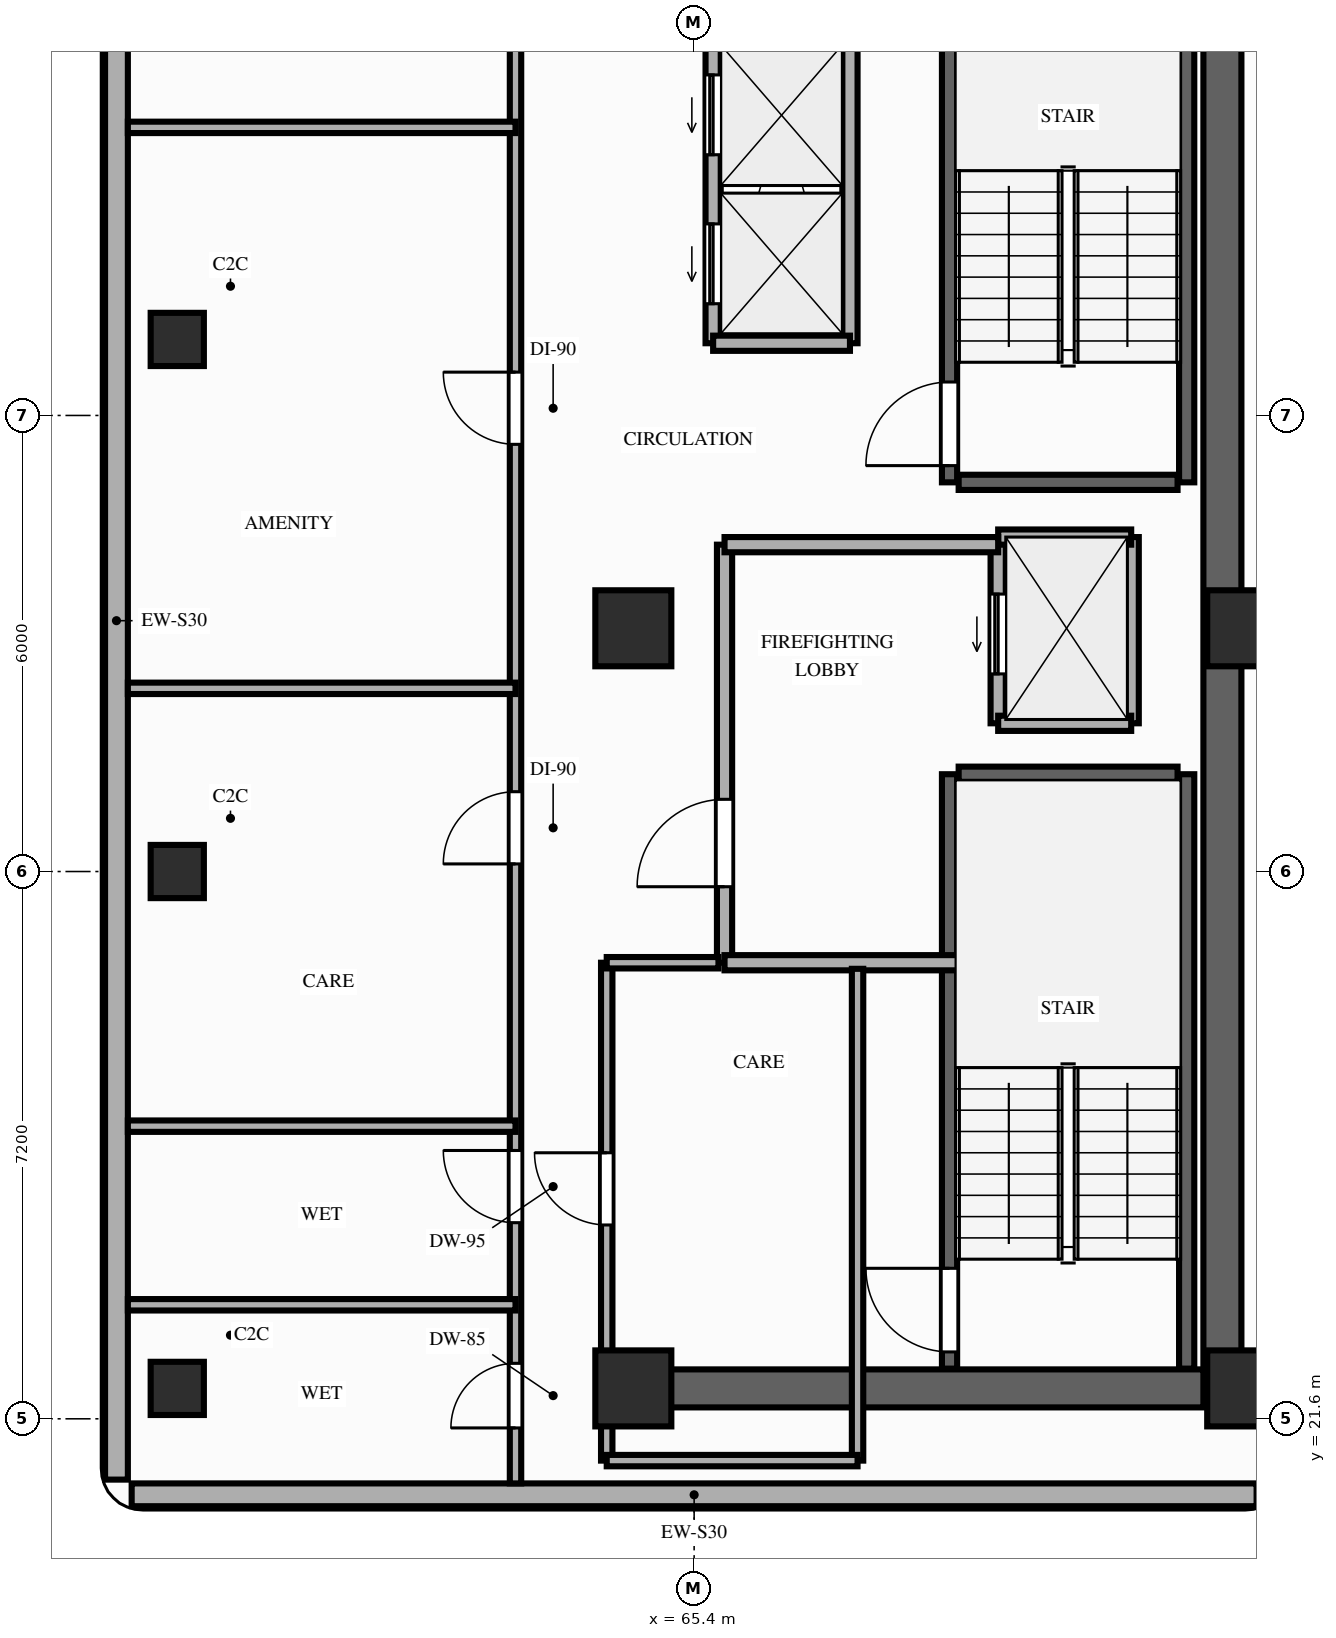
"""IFC4 building model, lengths in metres.
Left out: names, types, materials, properties, quantities, classifications, styles, units other than length and angle.
Written with IfcOpenShell. Run it as: python <this file> out.ifc"""

import sys

from ifc_helpers import new_model, si_unit, direction, frame, frame_2d, origin, origin_2d, place, context, subcontext, project, spatial, rectangle, extrude, element, fill, save


model = new_model("IFC4")
c1 = context("Model", 3, precision=1e-05, world=origin(), true_north=direction((0.0, 1.0)))
c2 = subcontext(c1, "Body", "Model", "MODEL_VIEW")
j1 = project(units=[si_unit("LENGTHUNIT", "METRE"), si_unit("PLANEANGLEUNIT", "RADIAN")], contexts=[c1])
p1 = place(None, origin())
s1 = spatial("IfcSite", under=j1, at=p1, CompositionType="ELEMENT")
p2 = place(p1, origin())
s2 = spatial("IfcBuilding", under=s1, at=p2, CompositionType="ELEMENT")
p3 = place(p2, frame((0.0, 0.0, 93.0)))
s3 = spatial("IfcBuildingStorey", under=s2, at=p3, CompositionType="ELEMENT", Elevation=93.0)
for number, where, z_axis, x_axis in (
    (1, (64.6, 22.0, 0.0), (0.0, 0.0, 1.0), (1.0, 0.0, 0.0)),
    (2, (72.65, 22.0, 0.0), (0.0, 0.0, 1.0), (1.0, 0.0, 0.0)),
    (3, (64.6, 32.0, 0.0), (0.0, 0.0, 1.0), (1.0, 0.0, 0.0)),
    (4, (72.65, 32.0, 0.0), (0.0, 0.0, 1.0), (1.0, 0.0, 0.0)),
):
    element("IfcColumn", number, at=place(p3, frame(where, z_axis=z_axis, x_axis=x_axis)), inside=s3, PredefinedType="COLUMN", context=c2, shape_type="SweptSolid", body=[
        extrude(rectangle(XDim=1.0, YDim=1.0, at=origin_2d()), origin(), (0.0, 0.0, 1.0), 3.2),
    ])
for number, where, z_axis, x_axis in (
    (5, (58.6, 22.0, 0.0), (0.0, 0.0, 1.0), (1.0, 0.0, 0.0)),
    (6, (58.6, 28.8, 0.0), (0.0, 0.0, 1.0), (1.0, 0.0, 0.0)),
    (7, (58.6, 35.8, 0.0), (0.0, 0.0, 1.0), (1.0, 0.0, 0.0)),
):
    element("IfcColumn", number, at=place(p3, frame(where, z_axis=z_axis, x_axis=x_axis)), inside=s3, PredefinedType="COLUMN", context=c2, shape_type="SweptSolid", body=[
        extrude(rectangle(XDim=0.7, YDim=0.7, at=origin_2d()), origin(), (0.0, 0.0, 1.0), 3.2),
    ])
p4 = place(p3, frame((57.8, 43.4, 0.0), z_axis=(0.0, 0.0, 1.0), x_axis=(0.0, -1.0, 0.0)))
e8 = element("IfcWall", 8, at=p4, inside=s3, PredefinedType="STANDARD", context=c2, shape_type="SweptSolid", body=[
    extrude(rectangle(XDim=22.6, YDim=0.3, at=frame_2d((11.3, 0.0))), origin(), (0.0, 0.0, 1.0), 2.73),
])
p5 = place(p3, frame((58.0, 20.6, 0.0), z_axis=(0.0, 0.0, 1.0), x_axis=(1.0, 0.0, 0.0)))
e9 = element("IfcWall", 9, at=p5, inside=s3, PredefinedType="STANDARD", context=c2, shape_type="SweptSolid", body=[
    extrude(rectangle(XDim=14.8, YDim=0.3, at=frame_2d((7.4, 0.0))), origin(), (0.0, 0.0, 1.0), 3.02),
])
p6 = place(p3, frame((72.35, 22.0, 0.0), z_axis=(0.0, 0.0, 1.0), x_axis=(0.0, 1.0, 0.0)))
e10 = element("IfcWall", 10, at=p6, inside=s3, PredefinedType="SHEAR", context=c2, shape_type="SweptSolid", body=[
    extrude(rectangle(XDim=20.25, YDim=0.5, at=frame_2d((10.125, 0.0))), origin(), (0.0, 0.0, 1.0), 3.02),
])
p7 = place(p3, frame((64.6, 22.0, 0.0), z_axis=(0.0, 0.0, 1.0), x_axis=(1.0, 0.0, 0.0)))
e11 = element("IfcWall", 11, at=p7, inside=s3, PredefinedType="SHEAR", context=c2, shape_type="SweptSolid", body=[
    extrude(rectangle(XDim=7.5, YDim=0.5, at=frame_2d((3.75, 0.0))), origin(), (0.0, 0.0, 1.0), 3.02),
])
p8 = place(p3, frame((68.76, 22.26, 0.0), z_axis=(0.0, 0.0, 1.0), x_axis=(0.0, 1.0, 0.0)))
e12 = element("IfcWall", 12, at=p8, inside=s3, PredefinedType="SHEAR", context=c2, shape_type="SweptSolid", body=[
    extrude(rectangle(XDim=7.82, YDim=0.2, at=frame_2d((3.91, 0.0))), origin(), (0.0, 0.0, 1.0), 3.02),
])
p9 = place(p8, frame((0.22, 0.0, 0.0)))
e13 = element("IfcOpeningElement", 13, at=p9, cuts=e12, PredefinedType="OPENING", context=c2, shape_type="SweptSolid", body=[
    extrude(rectangle(XDim=1.1, YDim=2.15, at=frame_2d((0.55, 1.075))), frame((0.0, 0.11, 0.0), z_axis=(0.0, -1.0, 0.0), x_axis=(1.0, 0.0, 0.0)), (0.0, 0.0, 1.0), 0.22),
])
p10 = place(p3, frame((71.88, 22.26, 0.0), z_axis=(0.0, 0.0, 1.0), x_axis=(0.0, 1.0, 0.0)))
e14 = element("IfcWall", 14, at=p10, inside=s3, PredefinedType="SHEAR", context=c2, shape_type="SweptSolid", body=[
    extrude(rectangle(XDim=7.82, YDim=0.2, at=frame_2d((3.91, 0.0))), origin(), (0.0, 0.0, 1.0), 3.02),
])
p11 = place(p3, frame((68.88, 30.08, 0.0), z_axis=(0.0, 0.0, 1.0), x_axis=(1.0, 0.0, 0.0)))
e15 = element("IfcWall", 15, at=p11, inside=s3, PredefinedType="SHEAR", context=c2, shape_type="SweptSolid", body=[
    extrude(rectangle(XDim=2.88, YDim=0.2, at=frame_2d((1.44, 0.0))), origin(), (0.0, 0.0, 1.0), 3.02),
])
p12 = place(p3, frame((68.76, 33.92, 0.0), z_axis=(0.0, 0.0, 1.0), x_axis=(0.0, 1.0, 0.0)))
e16 = element("IfcWall", 16, at=p12, inside=s3, PredefinedType="SHEAR", context=c2, shape_type="SweptSolid", body=[
    extrude(rectangle(XDim=7.96, YDim=0.2, at=frame_2d((3.98, 0.0))), origin(), (0.0, 0.0, 1.0), 3.02),
])
p13 = place(p12, frame((0.22, 0.0, 0.0)))
e17 = element("IfcOpeningElement", 17, at=p13, cuts=e16, PredefinedType="OPENING", context=c2, shape_type="SweptSolid", body=[
    extrude(rectangle(XDim=1.1, YDim=2.15, at=frame_2d((0.55, 1.075))), frame((0.0, 0.11, 0.0), z_axis=(0.0, -1.0, 0.0), x_axis=(1.0, 0.0, 0.0)), (0.0, 0.0, 1.0), 0.22),
])
p14 = place(p3, frame((71.88, 33.92, 0.0), z_axis=(0.0, 0.0, 1.0), x_axis=(0.0, 1.0, 0.0)))
e18 = element("IfcWall", 18, at=p14, inside=s3, PredefinedType="SHEAR", context=c2, shape_type="SweptSolid", body=[
    extrude(rectangle(XDim=7.96, YDim=0.2, at=frame_2d((3.98, 0.0))), origin(), (0.0, 0.0, 1.0), 3.02),
])
p15 = place(p3, frame((68.88, 33.92, 0.0), z_axis=(0.0, 0.0, 1.0), x_axis=(1.0, 0.0, 0.0)))
e19 = element("IfcWall", 19, at=p15, inside=s3, PredefinedType="SHEAR", context=c2, shape_type="SweptSolid", body=[
    extrude(rectangle(XDim=2.88, YDim=0.2, at=frame_2d((1.44, 0.0))), origin(), (0.0, 0.0, 1.0), 3.02),
])
p16 = place(p3, frame((65.65, 35.75, 0.0), z_axis=(0.0, 0.0, 1.0), x_axis=(0.0, 1.0, 0.0)))
e20 = element("IfcWall", 20, at=p16, inside=s3, PredefinedType="MOVABLE", context=c2, shape_type="SweptSolid", body=[
    extrude(rectangle(XDim=6.05, YDim=0.2, at=frame_2d((3.025, 0.0))), origin(), (0.0, 0.0, 1.0), 3.02),
])
p17 = place(p16, frame((0.52, 0.0, 0.0)))
e21 = element("IfcOpeningElement", 21, at=p17, cuts=e20, PredefinedType="OPENING", context=c2, shape_type="SweptSolid", body=[
    extrude(rectangle(XDim=1.05, YDim=2.15, at=frame_2d((0.525, 1.075))), frame((0.0, 0.11, 0.0), z_axis=(0.0, -1.0, 0.0), x_axis=(1.0, 0.0, 0.0)), (0.0, 0.0, 1.0), 0.22),
])
p18 = place(p16, frame((2.48, 0.0, 0.0)))
e22 = element("IfcOpeningElement", 22, at=p18, cuts=e20, PredefinedType="OPENING", context=c2, shape_type="SweptSolid", body=[
    extrude(rectangle(XDim=1.05, YDim=2.15, at=frame_2d((0.525, 1.075))), frame((0.0, 0.11, 0.0), z_axis=(0.0, -1.0, 0.0), x_axis=(1.0, 0.0, 0.0)), (0.0, 0.0, 1.0), 0.22),
])
p19 = place(p16, frame((4.43, 0.0, 0.0)))
e23 = element("IfcOpeningElement", 23, at=p19, cuts=e20, PredefinedType="OPENING", context=c2, shape_type="SweptSolid", body=[
    extrude(rectangle(XDim=1.05, YDim=2.15, at=frame_2d((0.525, 1.075))), frame((0.0, 0.11, 0.0), z_axis=(0.0, -1.0, 0.0), x_axis=(1.0, 0.0, 0.0)), (0.0, 0.0, 1.0), 0.22),
])
p20 = place(p3, frame((67.45, 35.75, 0.0), z_axis=(0.0, 0.0, 1.0), x_axis=(0.0, 1.0, 0.0)))
e24 = element("IfcWall", 24, at=p20, inside=s3, PredefinedType="MOVABLE", context=c2, shape_type="SweptSolid", body=[
    extrude(rectangle(XDim=6.05, YDim=0.2, at=frame_2d((3.025, 0.0))), origin(), (0.0, 0.0, 1.0), 3.02),
])
p21 = place(p3, frame((65.65, 35.75, 0.0), z_axis=(0.0, 0.0, 1.0), x_axis=(1.0, 0.0, 0.0)))
e25 = element("IfcWall", 25, at=p21, inside=s3, PredefinedType="MOVABLE", context=c2, shape_type="SweptSolid", body=[
    extrude(rectangle(XDim=1.8, YDim=0.2, at=frame_2d((0.9, 0.0))), origin(), (0.0, 0.0, 1.0), 3.02),
])
p22 = place(p3, frame((69.4, 30.75, 0.0), z_axis=(0.0, 0.0, 1.0), x_axis=(0.0, 1.0, 0.0)))
e26 = element("IfcWall", 26, at=p22, inside=s3, PredefinedType="MOVABLE", context=c2, shape_type="SweptSolid", body=[
    extrude(rectangle(XDim=2.45, YDim=0.2, at=frame_2d((1.225, 0.0))), origin(), (0.0, 0.0, 1.0), 3.02),
])
p23 = place(p22, frame((0.65, 0.0, 0.0)))
e27 = element("IfcOpeningElement", 27, at=p23, cuts=e26, PredefinedType="OPENING", context=c2, shape_type="SweptSolid", body=[
    extrude(rectangle(XDim=1.05, YDim=2.15, at=frame_2d((0.525, 1.075))), frame((0.0, 0.11, 0.0), z_axis=(0.0, -1.0, 0.0), x_axis=(1.0, 0.0, 0.0)), (0.0, 0.0, 1.0), 0.22),
])
p24 = place(p3, frame((71.15, 30.75, 0.0), z_axis=(0.0, 0.0, 1.0), x_axis=(0.0, 1.0, 0.0)))
e28 = element("IfcWall", 28, at=p24, inside=s3, PredefinedType="MOVABLE", context=c2, shape_type="SweptSolid", body=[
    extrude(rectangle(XDim=2.45, YDim=0.2, at=frame_2d((1.225, 0.0))), origin(), (0.0, 0.0, 1.0), 3.02),
])
for number, where, z_axis, x_axis in (
    (29, (69.4, 33.2, 0.0), (0.0, 0.0, 1.0), (1.0, 0.0, 0.0)),
    (30, (69.4, 30.75, 0.0), (0.0, 0.0, 1.0), (1.0, 0.0, 0.0)),
):
    element("IfcWall", number, at=place(p3, frame(where, z_axis=z_axis, x_axis=x_axis)), inside=s3, PredefinedType="MOVABLE", context=c2, shape_type="SweptSolid", body=[
        extrude(rectangle(XDim=1.75, YDim=0.2, at=frame_2d((0.875, 0.0))), origin(), (0.0, 0.0, 1.0), 3.02),
    ])
p25 = place(p3, frame((65.8, 27.6, 0.0), z_axis=(0.0, 0.0, 1.0), x_axis=(0.0, 1.0, 0.0)))
e31 = element("IfcWall", 31, at=p25, inside=s3, PredefinedType="PARTITIONING", context=c2, shape_type="SweptSolid", body=[
    extrude(rectangle(XDim=5.5, YDim=0.2, at=frame_2d((2.75, 0.0))), origin(), (0.0, 0.0, 1.0), 3.02),
])
p26 = place(p25, frame((1.0, 0.0, 0.0)))
e32 = element("IfcOpeningElement", 32, at=p26, cuts=e31, PredefinedType="OPENING", context=c2, shape_type="SweptSolid", body=[
    extrude(rectangle(XDim=1.15, YDim=2.15, at=frame_2d((0.575, 1.075))), frame((0.0, 0.11, 0.0), z_axis=(0.0, -1.0, 0.0), x_axis=(1.0, 0.0, 0.0)), (0.0, 0.0, 1.0), 0.22),
])
p27 = place(p3, frame((65.8, 33.1, 0.0), z_axis=(0.0, 0.0, 1.0), x_axis=(1.0, 0.0, 0.0)))
e33 = element("IfcWall", 33, at=p27, inside=s3, PredefinedType="PARTITIONING", context=c2, shape_type="SweptSolid", body=[
    extrude(rectangle(XDim=3.6, YDim=0.2, at=frame_2d((1.8, 0.0))), origin(), (0.0, 0.0, 1.0), 3.02),
])
p28 = place(p3, frame((65.8, 27.6, 0.0), z_axis=(0.0, 0.0, 1.0), x_axis=(1.0, 0.0, 0.0)))
e34 = element("IfcWall", 34, at=p28, inside=s3, PredefinedType="PARTITIONING", context=c2, shape_type="SweptSolid", body=[
    extrude(rectangle(XDim=3.4, YDim=0.2, at=frame_2d((1.7, 0.0))), origin(), (0.0, 0.0, 1.0), 3.02),
])
p29 = place(p3, frame((64.25, 21.05, 0.0), z_axis=(0.0, 0.0, 1.0), x_axis=(0.0, 1.0, 0.0)))
e35 = element("IfcWall", 35, at=p29, inside=s3, PredefinedType="PARTITIONING", context=c2, shape_type="SweptSolid", body=[
    extrude(rectangle(XDim=6.55, YDim=0.15, at=frame_2d((3.275, 0.0))), origin(), (0.0, 0.0, 1.0), 2.6),
])
p30 = place(p29, frame((3.1, 0.0, 0.0)))
e36 = element("IfcOpeningElement", 36, at=p30, cuts=e35, PredefinedType="OPENING", context=c2, shape_type="SweptSolid", body=[
    extrude(rectangle(XDim=0.95, YDim=2.15, at=frame_2d((0.475, 1.075))), frame((0.0, 0.085, 0.0), z_axis=(0.0, -1.0, 0.0), x_axis=(1.0, 0.0, 0.0)), (0.0, 0.0, 1.0), 0.17),
])
p31 = place(p3, frame((67.55, 21.05, 0.0), z_axis=(0.0, 0.0, 1.0), x_axis=(0.0, 1.0, 0.0)))
e37 = element("IfcWall", 37, at=p31, inside=s3, PredefinedType="PARTITIONING", context=c2, shape_type="SweptSolid", body=[
    extrude(rectangle(XDim=6.47, YDim=0.15, at=frame_2d((3.235, 0.0))), origin(), (0.0, 0.0, 1.0), 2.6),
])
p32 = place(p3, frame((64.25, 21.05, 0.0), z_axis=(0.0, 0.0, 1.0), x_axis=(1.0, 0.0, 0.0)))
e38 = element("IfcWall", 38, at=p32, inside=s3, PredefinedType="PARTITIONING", context=c2, shape_type="SweptSolid", body=[
    extrude(rectangle(XDim=3.3, YDim=0.15, at=frame_2d((1.65, 0.0))), origin(), (0.0, 0.0, 1.0), 3.02),
])
p33 = place(p3, frame((64.25, 27.6, 0.0), z_axis=(0.0, 0.0, 1.0), x_axis=(1.0, 0.0, 0.0)))
e39 = element("IfcWall", 39, at=p33, inside=s3, PredefinedType="PARTITIONING", context=c2, shape_type="SweptSolid", body=[
    extrude(rectangle(XDim=1.47, YDim=0.15, at=frame_2d((0.735, 0.0))), origin(), (0.0, 0.0, 1.0), 2.6),
])
p34 = place(p3, frame((63.05, 20.75, 0.0), z_axis=(0.0, 0.0, 1.0), x_axis=(0.0, 1.0, 0.0)))
e40 = element("IfcWall", 40, at=p34, inside=s3, PredefinedType="PARTITIONING", context=c2, shape_type="SweptSolid", body=[
    extrude(rectangle(XDim=22.7, YDim=0.15, at=frame_2d((11.35, 0.0))), origin(), (0.0, 0.0, 1.0), 2.6),
])
p35 = place(p34, frame((0.73, 0.0, 0.0)))
e41 = element("IfcOpeningElement", 41, at=p35, cuts=e40, PredefinedType="OPENING", context=c2, shape_type="SweptSolid", body=[
    extrude(rectangle(XDim=0.85, YDim=2.1, at=frame_2d((0.425, 1.05))), frame((0.0, 0.085, 0.0), z_axis=(0.0, -1.0, 0.0), x_axis=(1.0, 0.0, 0.0)), (0.0, 0.0, 1.0), 0.17),
])
p36 = place(p34, frame((3.43, 0.0, 0.0)))
e42 = element("IfcOpeningElement", 42, at=p36, cuts=e40, PredefinedType="OPENING", context=c2, shape_type="SweptSolid", body=[
    extrude(rectangle(XDim=0.95, YDim=2.1, at=frame_2d((0.475, 1.05))), frame((0.0, 0.085, 0.0), z_axis=(0.0, -1.0, 0.0), x_axis=(1.0, 0.0, 0.0)), (0.0, 0.0, 1.0), 0.17),
])
p37 = place(p34, frame((8.15, 0.0, 0.0)))
e43 = element("IfcOpeningElement", 43, at=p37, cuts=e40, PredefinedType="OPENING", context=c2, shape_type="SweptSolid", body=[
    extrude(rectangle(XDim=0.95, YDim=2.15, at=frame_2d((0.475, 1.075))), frame((0.0, 0.085, 0.0), z_axis=(0.0, -1.0, 0.0), x_axis=(1.0, 0.0, 0.0)), (0.0, 0.0, 1.0), 0.17),
])
p38 = place(p34, frame((13.67, 0.0, 0.0)))
e44 = element("IfcOpeningElement", 44, at=p38, cuts=e40, PredefinedType="OPENING", context=c2, shape_type="SweptSolid", body=[
    extrude(rectangle(XDim=0.95, YDim=2.15, at=frame_2d((0.475, 1.075))), frame((0.0, 0.085, 0.0), z_axis=(0.0, -1.0, 0.0), x_axis=(1.0, 0.0, 0.0)), (0.0, 0.0, 1.0), 0.17),
])
p39 = place(p34, frame((19.47, 0.0, 0.0)))
e45 = element("IfcOpeningElement", 45, at=p39, cuts=e40, PredefinedType="OPENING", context=c2, shape_type="SweptSolid", body=[
    extrude(rectangle(XDim=0.95, YDim=2.15, at=frame_2d((0.475, 1.075))), frame((0.0, 0.085, 0.0), z_axis=(0.0, -1.0, 0.0), x_axis=(1.0, 0.0, 0.0)), (0.0, 0.0, 1.0), 0.17),
])
for number, where, z_axis, x_axis in (
    (46, (57.95, 23.1, 0.0), (0.0, 0.0, 1.0), (1.0, 0.0, 0.0)),
    (47, (57.95, 25.45, 0.0), (0.0, 0.0, 1.0), (1.0, 0.0, 0.0)),
    (48, (57.95, 31.21, 0.0), (0.0, 0.0, 1.0), (1.0, 0.0, 0.0)),
    (49, (57.95, 38.59, 0.0), (0.0, 0.0, 1.0), (1.0, 0.0, 0.0)),
):
    element("IfcWall", number, at=place(p3, frame(where, z_axis=z_axis, x_axis=x_axis)), inside=s3, PredefinedType="PARTITIONING", context=c2, shape_type="SweptSolid", body=[
        extrude(rectangle(XDim=5.1, YDim=0.15, at=frame_2d((2.55, 0.0))), origin(), (0.0, 0.0, 1.0), 2.6),
    ])
p40 = place(p9, origin())
e50 = element("IfcDoor", 50, at=p40, inside=s3, OperationType="SINGLE_SWING_RIGHT", PredefinedType="DOOR", context=c2, shape_type="SweptSolid", body=[
    extrude(rectangle(XDim=1.1, YDim=2.15, at=frame_2d((0.55, 1.075))), frame((0.0, 0.025, 0.0), z_axis=(0.0, -1.0, 0.0), x_axis=(1.0, 0.0, 0.0)), (0.0, 0.0, 1.0), 0.05),
])
fill(e13, e50)
p41 = place(p13, origin())
e51 = element("IfcDoor", 51, at=p41, inside=s3, OperationType="SINGLE_SWING_LEFT", PredefinedType="DOOR", context=c2, shape_type="SweptSolid", body=[
    extrude(rectangle(XDim=1.1, YDim=2.15, at=frame_2d((0.55, 1.075))), frame((0.0, 0.025, 0.0), z_axis=(0.0, -1.0, 0.0), x_axis=(1.0, 0.0, 0.0)), (0.0, 0.0, 1.0), 0.05),
])
fill(e17, e51)
p42 = place(p17, origin())
e52 = element("IfcDoor", 52, at=p42, inside=s3, OperationType="SLIDING_TO_LEFT", PredefinedType="DOOR", context=c2, shape_type="SweptSolid", body=[
    extrude(rectangle(XDim=1.05, YDim=2.15, at=frame_2d((0.525, 1.075))), frame((0.0, 0.025, 0.0), z_axis=(0.0, -1.0, 0.0), x_axis=(1.0, 0.0, 0.0)), (0.0, 0.0, 1.0), 0.05),
])
fill(e21, e52)
p43 = place(p18, origin())
e53 = element("IfcDoor", 53, at=p43, inside=s3, OperationType="SLIDING_TO_LEFT", PredefinedType="DOOR", context=c2, shape_type="SweptSolid", body=[
    extrude(rectangle(XDim=1.05, YDim=2.15, at=frame_2d((0.525, 1.075))), frame((0.0, 0.025, 0.0), z_axis=(0.0, -1.0, 0.0), x_axis=(1.0, 0.0, 0.0)), (0.0, 0.0, 1.0), 0.05),
])
fill(e22, e53)
p44 = place(p23, origin())
e54 = element("IfcDoor", 54, at=p44, inside=s3, OperationType="SLIDING_TO_LEFT", PredefinedType="DOOR", context=c2, shape_type="SweptSolid", body=[
    extrude(rectangle(XDim=1.05, YDim=2.15, at=frame_2d((0.525, 1.075))), frame((0.0, 0.025, 0.0), z_axis=(0.0, -1.0, 0.0), x_axis=(1.0, 0.0, 0.0)), (0.0, 0.0, 1.0), 0.05),
])
fill(e27, e54)
p45 = place(p26, origin())
e55 = element("IfcDoor", 55, at=p45, inside=s3, OperationType="SINGLE_SWING_LEFT", PredefinedType="DOOR", context=c2, shape_type="SweptSolid", body=[
    extrude(rectangle(XDim=1.15, YDim=2.15, at=frame_2d((0.575, 1.075))), frame((0.0, 0.025, 0.0), z_axis=(0.0, -1.0, 0.0), x_axis=(1.0, 0.0, 0.0)), (0.0, 0.0, 1.0), 0.05),
])
fill(e32, e55)
p46 = place(p30, origin())
e56 = element("IfcDoor", 56, at=p46, inside=s3, OperationType="SINGLE_SWING_RIGHT", PredefinedType="DOOR", context=c2, shape_type="SweptSolid", body=[
    extrude(rectangle(XDim=0.95, YDim=2.15, at=frame_2d((0.475, 1.075))), frame((0.0, 0.025, 0.0), z_axis=(0.0, -1.0, 0.0), x_axis=(1.0, 0.0, 0.0)), (0.0, 0.0, 1.0), 0.05),
])
fill(e36, e56)
p47 = place(p35, origin())
e57 = element("IfcDoor", 57, at=p47, inside=s3, OperationType="SINGLE_SWING_LEFT", PredefinedType="DOOR", context=c2, shape_type="SweptSolid", body=[
    extrude(rectangle(XDim=0.85, YDim=2.1, at=frame_2d((0.425, 1.05))), frame((0.0, 0.025, 0.0), z_axis=(0.0, -1.0, 0.0), x_axis=(1.0, 0.0, 0.0)), (0.0, 0.0, 1.0), 0.05),
])
fill(e41, e57)
p48 = place(p36, origin())
e58 = element("IfcDoor", 58, at=p48, inside=s3, OperationType="SINGLE_SWING_RIGHT", PredefinedType="DOOR", context=c2, shape_type="SweptSolid", body=[
    extrude(rectangle(XDim=0.95, YDim=2.1, at=frame_2d((0.475, 1.05))), frame((0.0, 0.025, 0.0), z_axis=(0.0, -1.0, 0.0), x_axis=(1.0, 0.0, 0.0)), (0.0, 0.0, 1.0), 0.05),
])
fill(e42, e58)
p49 = place(p37, origin())
e59 = element("IfcDoor", 59, at=p49, inside=s3, OperationType="SINGLE_SWING_LEFT", PredefinedType="DOOR", context=c2, shape_type="SweptSolid", body=[
    extrude(rectangle(XDim=0.95, YDim=2.15, at=frame_2d((0.475, 1.075))), frame((0.0, 0.025, 0.0), z_axis=(0.0, -1.0, 0.0), x_axis=(1.0, 0.0, 0.0)), (0.0, 0.0, 1.0), 0.05),
])
fill(e43, e59)
p50 = place(p38, origin())
e60 = element("IfcDoor", 60, at=p50, inside=s3, OperationType="SINGLE_SWING_RIGHT", PredefinedType="DOOR", context=c2, shape_type="SweptSolid", body=[
    extrude(rectangle(XDim=0.95, YDim=2.15, at=frame_2d((0.475, 1.075))), frame((0.0, 0.025, 0.0), z_axis=(0.0, -1.0, 0.0), x_axis=(1.0, 0.0, 0.0)), (0.0, 0.0, 1.0), 0.05),
])
fill(e44, e60)
save(model, sys.argv[1])
